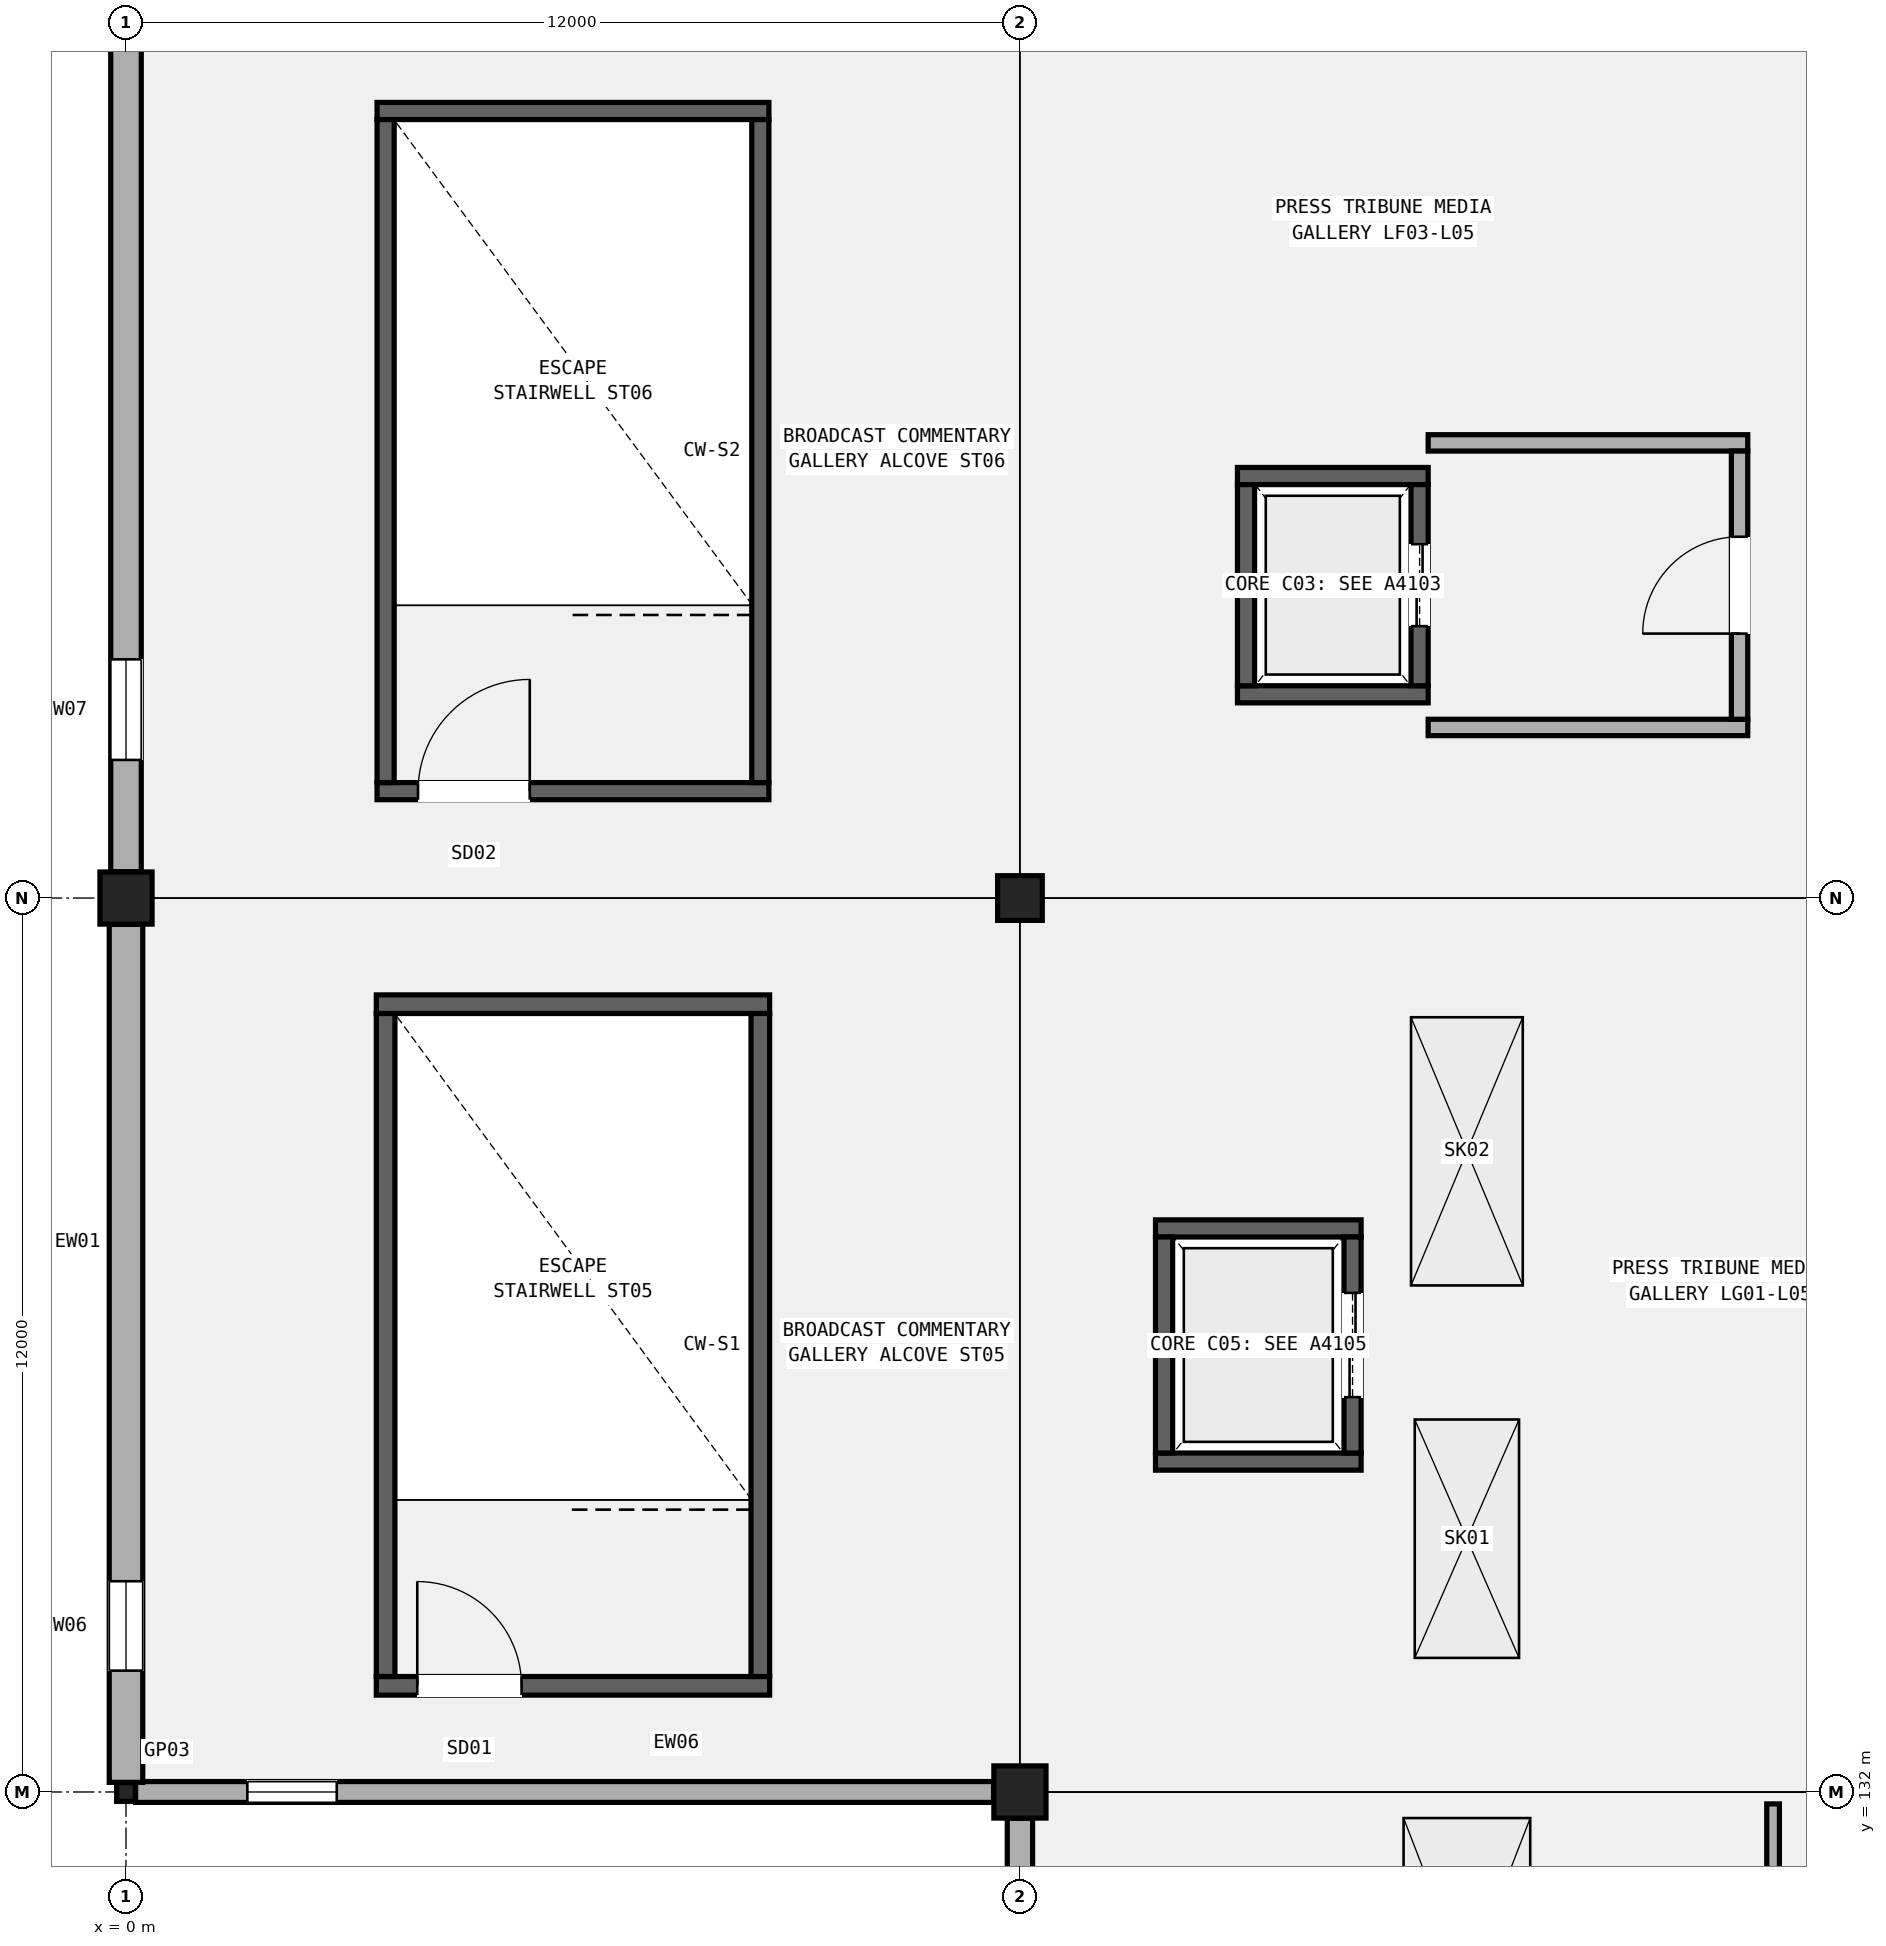
"""IFC4 building model, lengths in metres.
Left out: names, types, materials, properties, quantities, classifications, styles, units other than length and angle.
Written with IfcOpenShell. Run it as: python <this file> out.ifc"""

import sys

from ifc_helpers import new_model, si_unit, direction, frame, frame_2d, origin, origin_2d, place, context, subcontext, project, spatial, rectangle, hollow_rectangle, extrude, element, fill, save


model = new_model("IFC4")
c1 = context("Model", 3, precision=1e-05, world=origin(), true_north=direction((0.0, 1.0)))
c2 = subcontext(c1, "Body", "Model", "MODEL_VIEW")
j1 = project(units=[si_unit("LENGTHUNIT", "METRE"), si_unit("PLANEANGLEUNIT", "RADIAN")], contexts=[c1])
p1 = place(None, origin())
s1 = spatial("IfcSite", under=j1, at=p1, CompositionType="ELEMENT")
p2 = place(p1, origin())
s2 = spatial("IfcBuilding", under=s1, at=p2, CompositionType="ELEMENT")
p3 = place(p2, frame((0.0, 0.0, 25.8)))
s3 = spatial("IfcBuildingStorey", under=s2, at=p3, CompositionType="ELEMENT", Elevation=25.8)
p4 = place(p3, frame((0.0, 132.0, 0.0), z_axis=(0.0, 0.0, 1.0), x_axis=(1.0, 0.0, 0.0)))
e1 = element("IfcColumn", 1, at=p4, inside=s3, PredefinedType="COLUMN", context=c2, shape_type="SweptSolid", body=[
    extrude(hollow_rectangle(XDim=0.25, YDim=0.25, WallThickness=0.012, InnerFilletRadius=0.012, OuterFilletRadius=0.024, at=origin_2d()), origin(), (0.0, 0.0, 1.0), 5.4),
])
for number, where, z_axis, x_axis in (
    (2, (0.0, 144.0, 0.0), (0.0, 0.0, 1.0), (1.0, 0.0, 0.0)),
    (3, (12.0, 132.0, 0.0), (0.0, 0.0, 1.0), (1.0, 0.0, 0.0)),
):
    element("IfcColumn", number, at=place(p3, frame(where, z_axis=z_axis, x_axis=x_axis)), inside=s3, PredefinedType="COLUMN", context=c2, shape_type="SweptSolid", body=[
        extrude(rectangle(XDim=0.7, YDim=0.7, at=origin_2d()), origin(), (0.0, 0.0, 1.0), 5.4),
    ])
p5 = place(p3, frame((12.0, 144.0, 0.0), z_axis=(0.0, 0.0, 1.0), x_axis=(1.0, 0.0, 0.0)))
e4 = element("IfcColumn", 4, at=p5, inside=s3, PredefinedType="COLUMN", context=c2, shape_type="SweptSolid", body=[
    extrude(rectangle(XDim=0.6, YDim=0.6, at=origin_2d()), origin(), (0.0, 0.0, 1.0), 5.4),
])
p6 = place(p3, frame((0.129, 132.0, 0.0), z_axis=(0.0, 0.0, 1.0), x_axis=(1.0, 0.0, 0.0)))
e5 = element("IfcWall", 5, at=p6, inside=s3, PredefinedType="SOLIDWALL", context=c2, shape_type="SweptSolid", body=[
    extrude(rectangle(XDim=11.517, YDim=0.28, at=frame_2d((5.759, 0.0))), origin(), (0.0, 0.0, 1.0), 4.452),
])
p7 = place(p6, frame((1.5, 0.0, 0.95)))
e6 = element("IfcOpeningElement", 6, at=p7, cuts=e5, PredefinedType="OPENING", context=c2, shape_type="SweptSolid", body=[
    extrude(rectangle(XDim=1.2, YDim=1.9, at=frame_2d((0.6, 0.95))), frame((0.0, 0.15, 0.0), z_axis=(0.0, -1.0, 0.0), x_axis=(1.0, 0.0, 0.0)), (0.0, 0.0, 1.0), 0.3),
])
p8 = place(p3, frame((0.0, 132.129, 0.0), z_axis=(0.0, 0.0, 1.0), x_axis=(0.0, 1.0, 0.0)))
e7 = element("IfcWall", 7, at=p8, inside=s3, PredefinedType="SOLIDWALL", context=c2, shape_type="SweptSolid", body=[
    extrude(rectangle(XDim=11.517, YDim=0.45, at=frame_2d((5.759, 0.0))), origin(), (0.0, 0.0, 1.0), 4.452),
])
p9 = place(p8, frame((1.5, 0.0, 0.95)))
e8 = element("IfcOpeningElement", 8, at=p9, cuts=e7, PredefinedType="OPENING", context=c2, shape_type="SweptSolid", body=[
    extrude(rectangle(XDim=1.2, YDim=2.3, at=frame_2d((0.6, 1.15))), frame((0.0, 0.235, 0.0), z_axis=(0.0, -1.0, 0.0), x_axis=(1.0, 0.0, 0.0)), (0.0, 0.0, 1.0), 0.47),
])
p10 = place(p3, frame((0.0, 144.354, 0.0), z_axis=(0.0, 0.0, 1.0), x_axis=(0.0, 1.0, 0.0)))
e9 = element("IfcWall", 9, at=p10, inside=s3, PredefinedType="SOLIDWALL", context=c2, shape_type="SweptSolid", body=[
    extrude(rectangle(XDim=11.342, YDim=0.41, at=frame_2d((5.671, 0.0))), origin(), (0.0, 0.0, 1.0), 4.34),
])
p11 = place(p10, frame((1.5, 0.0, 0.95)))
e10 = element("IfcOpeningElement", 10, at=p11, cuts=e9, PredefinedType="OPENING", context=c2, shape_type="SweptSolid", body=[
    extrude(rectangle(XDim=1.35, YDim=2.0, at=frame_2d((0.675, 1.0))), frame((0.0, 0.215, 0.0), z_axis=(0.0, -1.0, 0.0), x_axis=(1.0, 0.0, 0.0)), (0.0, 0.0, 1.0), 0.43),
])
p12 = place(p3, frame((12.0, 120.129, 0.0), z_axis=(0.0, 0.0, 1.0), x_axis=(0.0, 1.0, 0.0)))
e11 = element("IfcWall", 11, at=p12, inside=s3, PredefinedType="SOLIDWALL", context=c2, shape_type="SweptSolid", body=[
    extrude(rectangle(XDim=11.517, YDim=0.34, at=frame_2d((5.759, 0.0))), origin(), (0.0, 0.0, 1.0), 4.452),
])
p13 = place(p12, frame((6.034, 0.0, 0.95)))
e12 = element("IfcOpeningElement", 12, at=p13, cuts=e11, PredefinedType="OPENING", context=c2, shape_type="SweptSolid", body=[
    extrude(rectangle(XDim=2.25, YDim=1.8, at=frame_2d((1.125, 0.9))), frame((0.0, 0.18, 0.0), z_axis=(0.0, -1.0, 0.0), x_axis=(1.0, 0.0, 0.0)), (0.0, 0.0, 1.0), 0.36),
])
p14 = place(p3, frame((3.36, 133.425, 0.0), z_axis=(0.0, 0.0, 1.0), x_axis=(1.0, 0.0, 0.0)))
e13 = element("IfcWall", 13, at=p14, inside=s3, PredefinedType="SHEAR", context=c2, shape_type="SweptSolid", body=[
    extrude(rectangle(XDim=5.28, YDim=0.25, at=frame_2d((2.64, 0.0))), origin(), (0.0, 0.0, 1.0), 5.04),
])
p15 = place(p14, frame((0.55, 0.0, 0.0)))
e14 = element("IfcOpeningElement", 14, at=p15, cuts=e13, PredefinedType="OPENING", context=c2, shape_type="SweptSolid", body=[
    extrude(rectangle(XDim=1.4, YDim=2.15, at=frame_2d((0.7, 1.075))), frame((0.0, 0.135, 0.0), z_axis=(0.0, -1.0, 0.0), x_axis=(1.0, 0.0, 0.0)), (0.0, 0.0, 1.0), 0.27),
])
p16 = place(p3, frame((3.36, 142.575, 0.0), z_axis=(0.0, 0.0, 1.0), x_axis=(1.0, 0.0, 0.0)))
e15 = element("IfcWall", 15, at=p16, inside=s3, PredefinedType="SHEAR", context=c2, shape_type="SweptSolid", body=[
    extrude(rectangle(XDim=5.28, YDim=0.25, at=frame_2d((2.64, 0.0))), origin(), (0.0, 0.0, 1.0), 5.04),
])
for number, where, z_axis, x_axis in (
    (16, (3.485, 133.55, 0.0), (0.0, 0.0, 1.0), (0.0, 1.0, 0.0)),
    (17, (8.515, 133.55, 0.0), (0.0, 0.0, 1.0), (0.0, 1.0, 0.0)),
):
    element("IfcWall", number, at=place(p3, frame(where, z_axis=z_axis, x_axis=x_axis)), inside=s3, PredefinedType="SHEAR", context=c2, shape_type="SweptSolid", body=[
        extrude(rectangle(XDim=8.9, YDim=0.25, at=frame_2d((4.45, 0.0))), origin(), (0.0, 0.0, 1.0), 5.04),
    ])
p17 = place(p3, frame((3.37, 145.435, 0.0), z_axis=(0.0, 0.0, 1.0), x_axis=(1.0, 0.0, 0.0)))
e18 = element("IfcWall", 18, at=p17, inside=s3, PredefinedType="SHEAR", context=c2, shape_type="SweptSolid", body=[
    extrude(rectangle(XDim=5.26, YDim=0.23, at=frame_2d((2.63, 0.0))), origin(), (0.0, 0.0, 1.0), 5.04),
])
p18 = place(p17, frame((0.55, 0.0, 0.0)))
e19 = element("IfcOpeningElement", 19, at=p18, cuts=e18, PredefinedType="OPENING", context=c2, shape_type="SweptSolid", body=[
    extrude(rectangle(XDim=1.5, YDim=2.2, at=frame_2d((0.75, 1.1))), frame((0.0, 0.125, 0.0), z_axis=(0.0, -1.0, 0.0), x_axis=(1.0, 0.0, 0.0)), (0.0, 0.0, 1.0), 0.25),
])
p19 = place(p3, frame((3.37, 154.565, 0.0), z_axis=(0.0, 0.0, 1.0), x_axis=(1.0, 0.0, 0.0)))
e20 = element("IfcWall", 20, at=p19, inside=s3, PredefinedType="SHEAR", context=c2, shape_type="SweptSolid", body=[
    extrude(rectangle(XDim=5.26, YDim=0.23, at=frame_2d((2.63, 0.0))), origin(), (0.0, 0.0, 1.0), 5.04),
])
for number, where, z_axis, x_axis in (
    (21, (3.485, 145.55, 0.0), (0.0, 0.0, 1.0), (0.0, 1.0, 0.0)),
    (22, (8.515, 145.55, 0.0), (0.0, 0.0, 1.0), (0.0, 1.0, 0.0)),
):
    element("IfcWall", number, at=place(p3, frame(where, z_axis=z_axis, x_axis=x_axis)), inside=s3, PredefinedType="SHEAR", context=c2, shape_type="SweptSolid", body=[
        extrude(rectangle(XDim=8.9, YDim=0.23, at=frame_2d((4.45, 0.0))), origin(), (0.0, 0.0, 1.0), 5.04),
    ])
for number, where, z_axis, x_axis in (
    (23, (14.92, 146.735, 0.0), (0.0, 0.0, 1.0), (1.0, 0.0, 0.0)),
    (24, (14.92, 149.665, 0.0), (0.0, 0.0, 1.0), (1.0, 0.0, 0.0)),
):
    element("IfcWall", number, at=place(p3, frame(where, z_axis=z_axis, x_axis=x_axis)), inside=s3, PredefinedType="SHEAR", context=c2, shape_type="SweptSolid", body=[
        extrude(rectangle(XDim=2.56, YDim=0.23, at=frame_2d((1.28, 0.0))), origin(), (0.0, 0.0, 1.0), 5.04),
    ])
p20 = place(p3, frame((15.035, 146.85, 0.0), z_axis=(0.0, 0.0, 1.0), x_axis=(0.0, 1.0, 0.0)))
e25 = element("IfcWall", 25, at=p20, inside=s3, PredefinedType="SHEAR", context=c2, shape_type="SweptSolid", body=[
    extrude(rectangle(XDim=2.7, YDim=0.23, at=frame_2d((1.35, 0.0))), origin(), (0.0, 0.0, 1.0), 5.04),
])
p21 = place(p3, frame((17.365, 146.85, 0.0), z_axis=(0.0, 0.0, 1.0), x_axis=(0.0, 1.0, 0.0)))
e26 = element("IfcWall", 26, at=p21, inside=s3, PredefinedType="SHEAR", context=c2, shape_type="SweptSolid", body=[
    extrude(rectangle(XDim=2.7, YDim=0.23, at=frame_2d((1.35, 0.0))), origin(), (0.0, 0.0, 1.0), 5.04),
])
p22 = place(p21, frame((0.8, 0.0, 0.0)))
e27 = element("IfcOpeningElement", 27, at=p22, cuts=e26, PredefinedType="OPENING", context=c2, shape_type="SweptSolid", body=[
    extrude(rectangle(XDim=1.1, YDim=2.15, at=frame_2d((0.55, 1.075))), frame((0.0, 0.125, 0.0), z_axis=(0.0, -1.0, 0.0), x_axis=(1.0, 0.0, 0.0)), (0.0, 0.0, 1.0), 0.25),
])
for number, where, z_axis, x_axis in (
    (28, (17.48, 146.29, 0.0), (0.0, 0.0, 1.0), (1.0, 0.0, 0.0)),
    (29, (17.48, 150.11, 0.0), (0.0, 0.0, 1.0), (1.0, 0.0, 0.0)),
):
    element("IfcWall", number, at=place(p3, frame(where, z_axis=z_axis, x_axis=x_axis)), inside=s3, PredefinedType="SOLIDWALL", context=c2, shape_type="SweptSolid", body=[
        extrude(rectangle(XDim=4.29, YDim=0.22, at=frame_2d((2.145, 0.0))), origin(), (0.0, 0.0, 1.0), 4.35),
    ])
p23 = place(p3, frame((21.66, 146.4, 0.0), z_axis=(0.0, 0.0, 1.0), x_axis=(0.0, 1.0, 0.0)))
e30 = element("IfcWall", 30, at=p23, inside=s3, PredefinedType="SOLIDWALL", context=c2, shape_type="SweptSolid", body=[
    extrude(rectangle(XDim=3.6, YDim=0.22, at=frame_2d((1.8, 0.0))), origin(), (0.0, 0.0, 1.0), 4.35),
])
p24 = place(p23, frame((1.15, 0.0, 0.0)))
e31 = element("IfcOpeningElement", 31, at=p24, cuts=e30, PredefinedType="OPENING", context=c2, shape_type="SweptSolid", body=[
    extrude(rectangle(XDim=1.3, YDim=2.15, at=frame_2d((0.65, 1.075))), frame((0.0, 0.12, 0.0), z_axis=(0.0, -1.0, 0.0), x_axis=(1.0, 0.0, 0.0)), (0.0, 0.0, 1.0), 0.24),
])
for number, where, z_axis, x_axis in (
    (32, (13.82, 136.435, 0.0), (0.0, 0.0, 1.0), (1.0, 0.0, 0.0)),
    (33, (13.82, 139.565, 0.0), (0.0, 0.0, 1.0), (1.0, 0.0, 0.0)),
):
    element("IfcWall", number, at=place(p3, frame(where, z_axis=z_axis, x_axis=x_axis)), inside=s3, PredefinedType="SHEAR", context=c2, shape_type="SweptSolid", body=[
        extrude(rectangle(XDim=2.76, YDim=0.23, at=frame_2d((1.38, 0.0))), origin(), (0.0, 0.0, 1.0), 5.04),
    ])
p25 = place(p3, frame((13.935, 136.55, 0.0), z_axis=(0.0, 0.0, 1.0), x_axis=(0.0, 1.0, 0.0)))
e34 = element("IfcWall", 34, at=p25, inside=s3, PredefinedType="SHEAR", context=c2, shape_type="SweptSolid", body=[
    extrude(rectangle(XDim=2.9, YDim=0.23, at=frame_2d((1.45, 0.0))), origin(), (0.0, 0.0, 1.0), 5.04),
])
p26 = place(p3, frame((16.465, 136.55, 0.0), z_axis=(0.0, 0.0, 1.0), x_axis=(0.0, 1.0, 0.0)))
e35 = element("IfcWall", 35, at=p26, inside=s3, PredefinedType="SHEAR", context=c2, shape_type="SweptSolid", body=[
    extrude(rectangle(XDim=2.9, YDim=0.23, at=frame_2d((1.45, 0.0))), origin(), (0.0, 0.0, 1.0), 5.04),
])
p27 = place(p26, frame((0.75, 0.0, 0.0)))
e36 = element("IfcOpeningElement", 36, at=p27, cuts=e35, PredefinedType="OPENING", context=c2, shape_type="SweptSolid", body=[
    extrude(rectangle(XDim=1.4, YDim=2.25, at=frame_2d((0.7, 1.125))), frame((0.0, 0.125, 0.0), z_axis=(0.0, -1.0, 0.0), x_axis=(1.0, 0.0, 0.0)), (0.0, 0.0, 1.0), 0.25),
])
p28 = place(p3, frame((22.11, 120.16, 0.0), z_axis=(0.0, 0.0, 1.0), x_axis=(0.0, 1.0, 0.0)))
e37 = element("IfcWall", 37, at=p28, inside=s3, PredefinedType="PARTITIONING", context=c2, shape_type="SweptSolid", body=[
    extrude(rectangle(XDim=11.68, YDim=0.17, at=frame_2d((5.84, 0.0))), origin(), (0.0, 0.0, 1.0), 4.35),
])
p29 = place(p28, frame((2.086, 0.0, 0.0)))
e38 = element("IfcOpeningElement", 38, at=p29, cuts=e37, PredefinedType="OPENING", context=c2, shape_type="SweptSolid", body=[
    extrude(rectangle(XDim=1.12, YDim=2.18, at=frame_2d((0.56, 1.09))), frame((0.0, 0.095, 0.0), z_axis=(0.0, -1.0, 0.0), x_axis=(1.0, 0.0, 0.0)), (0.0, 0.0, 1.0), 0.19),
])
p30 = place(p28, frame((7.991, 0.0, 0.0)))
e39 = element("IfcOpeningElement", 39, at=p30, cuts=e37, PredefinedType="OPENING", context=c2, shape_type="SweptSolid", body=[
    extrude(rectangle(XDim=1.15, YDim=2.15, at=frame_2d((0.575, 1.075))), frame((0.0, 0.095, 0.0), z_axis=(0.0, -1.0, 0.0), x_axis=(1.0, 0.0, 0.0)), (0.0, 0.0, 1.0), 0.19),
])
p31 = place(p7, origin())
e40 = element("IfcWindow", 40, at=p31, inside=s3, PartitioningType="SINGLE_PANEL", PredefinedType="WINDOW", context=c2, shape_type="SweptSolid", body=[
    extrude(rectangle(XDim=1.2, YDim=1.9, at=frame_2d((0.6, 0.95))), frame((0.0, 0.03, 0.0), z_axis=(0.0, -1.0, 0.0), x_axis=(1.0, 0.0, 0.0)), (0.0, 0.0, 1.0), 0.06),
])
fill(e6, e40)
p32 = place(p9, origin())
e41 = element("IfcWindow", 41, at=p32, inside=s3, PartitioningType="SINGLE_PANEL", PredefinedType="WINDOW", context=c2, shape_type="SweptSolid", body=[
    extrude(rectangle(XDim=1.2, YDim=2.3, at=frame_2d((0.6, 1.15))), frame((0.0, 0.03, 0.0), z_axis=(0.0, -1.0, 0.0), x_axis=(1.0, 0.0, 0.0)), (0.0, 0.0, 1.0), 0.06),
])
fill(e8, e41)
p33 = place(p11, origin())
e42 = element("IfcWindow", 42, at=p33, inside=s3, PartitioningType="SINGLE_PANEL", PredefinedType="WINDOW", context=c2, shape_type="SweptSolid", body=[
    extrude(rectangle(XDim=1.35, YDim=2.0, at=frame_2d((0.675, 1.0))), frame((0.0, 0.03, 0.0), z_axis=(0.0, -1.0, 0.0), x_axis=(1.0, 0.0, 0.0)), (0.0, 0.0, 1.0), 0.06),
])
fill(e10, e42)
p34 = place(p2, frame((0.0, 0.0, 31.2)))
p35 = place(p34, frame((0.0, 0.0, -0.36)))
p36 = place(p35, frame((18.0, 135.4, 0.0)))
p37 = place(p36, frame((0.0, 0.0, 0.31)))
e43 = element("IfcWindow", 43, at=p37, inside=s3, PartitioningType="SINGLE_PANEL", PredefinedType="SKYLIGHT", context=c2, shape_type="SweptSolid", body=[
    extrude(rectangle(XDim=3.2, YDim=1.4, at=origin_2d()), origin(), (0.0, 0.0, 1.0), 0.05),
])
p38 = place(p35, frame((18.0, 140.6, 0.0)))
p39 = place(p38, frame((0.0, 0.0, 0.31)))
e44 = element("IfcWindow", 44, at=p39, inside=s3, PartitioningType="SINGLE_PANEL", PredefinedType="SKYLIGHT", context=c2, shape_type="SweptSolid", body=[
    extrude(rectangle(XDim=3.6, YDim=1.5, at=origin_2d()), origin(), (0.0, 0.0, 1.0), 0.05),
])
p40 = place(p15, origin())
e45 = element("IfcDoor", 45, at=p40, inside=s3, OperationType="SINGLE_SWING_LEFT", PredefinedType="DOOR", context=c2, shape_type="SweptSolid", body=[
    extrude(rectangle(XDim=1.4, YDim=2.15, at=frame_2d((0.7, 1.075))), frame((0.0, 0.025, 0.0), z_axis=(0.0, -1.0, 0.0), x_axis=(1.0, 0.0, 0.0)), (0.0, 0.0, 1.0), 0.05),
])
fill(e14, e45)
p41 = place(p18, origin())
e46 = element("IfcDoor", 46, at=p41, inside=s3, OperationType="SINGLE_SWING_RIGHT", PredefinedType="DOOR", context=c2, shape_type="SweptSolid", body=[
    extrude(rectangle(XDim=1.5, YDim=2.2, at=frame_2d((0.75, 1.1))), frame((0.0, 0.025, 0.0), z_axis=(0.0, -1.0, 0.0), x_axis=(1.0, 0.0, 0.0)), (0.0, 0.0, 1.0), 0.05),
])
fill(e19, e46)
p42 = place(p22, origin())
e47 = element("IfcDoor", 47, at=p42, inside=s3, OperationType="DOUBLE_DOOR_SLIDING", PredefinedType="DOOR", context=c2, shape_type="SweptSolid", body=[
    extrude(rectangle(XDim=1.1, YDim=2.15, at=frame_2d((0.55, 1.075))), frame((0.0, 0.025, 0.0), z_axis=(0.0, -1.0, 0.0), x_axis=(1.0, 0.0, 0.0)), (0.0, 0.0, 1.0), 0.05),
])
fill(e27, e47)
p43 = place(p24, origin())
e48 = element("IfcDoor", 48, at=p43, inside=s3, OperationType="SINGLE_SWING_LEFT", PredefinedType="DOOR", context=c2, shape_type="SweptSolid", body=[
    extrude(rectangle(XDim=1.3, YDim=2.15, at=frame_2d((0.65, 1.075))), frame((0.0, 0.025, 0.0), z_axis=(0.0, -1.0, 0.0), x_axis=(1.0, 0.0, 0.0)), (0.0, 0.0, 1.0), 0.05),
])
fill(e31, e48)
p44 = place(p27, origin())
e49 = element("IfcDoor", 49, at=p44, inside=s3, OperationType="DOUBLE_DOOR_SLIDING", PredefinedType="DOOR", context=c2, shape_type="SweptSolid", body=[
    extrude(rectangle(XDim=1.4, YDim=2.25, at=frame_2d((0.7, 1.125))), frame((0.0, 0.025, 0.0), z_axis=(0.0, -1.0, 0.0), x_axis=(1.0, 0.0, 0.0)), (0.0, 0.0, 1.0), 0.05),
])
fill(e36, e49)
save(model, sys.argv[1])
